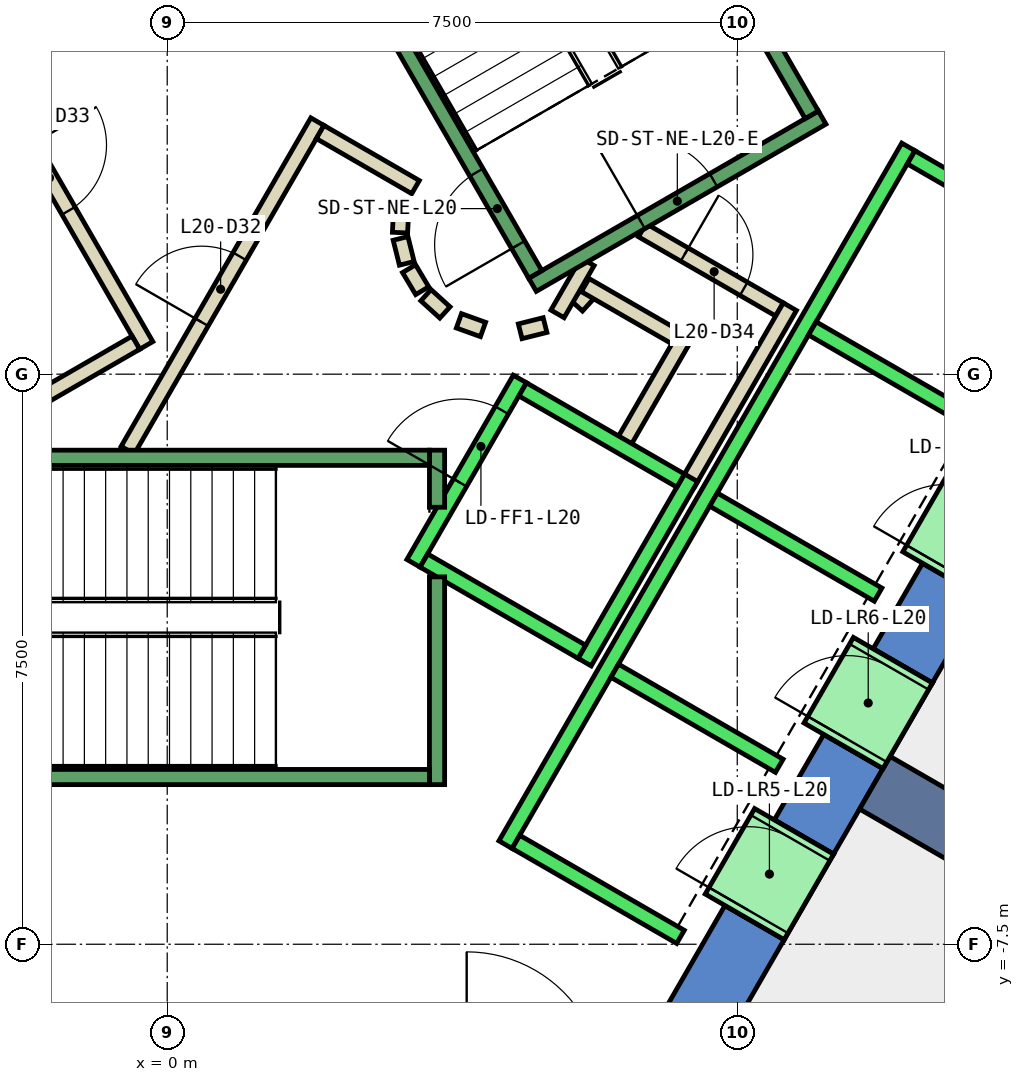
"""IFC4 building model, lengths in metres.
Left out: names, types, materials, properties, quantities, classifications, styles, units other than length and angle.
Written with IfcOpenShell. Run it as: python <this file> out.ifc"""

import sys

from ifc_helpers import new_model, si_unit, direction, frame, frame_2d, origin, place, context, subcontext, project, spatial, polyline, rectangle, outline, extrude, element, fill, save


model = new_model("IFC4")
c1 = context("Model", 3, precision=1e-05, world=origin(), true_north=direction((0.0, 1.0)))
c2 = subcontext(c1, "Body", "Model", "MODEL_VIEW")
j1 = project(units=[si_unit("LENGTHUNIT", "METRE"), si_unit("PLANEANGLEUNIT", "RADIAN")], contexts=[c1])
p1 = place(None, origin())
s1 = spatial("IfcSite", under=j1, at=p1, CompositionType="ELEMENT")
p2 = place(p1, origin())
s2 = spatial("IfcBuilding", under=s1, at=p2, CompositionType="ELEMENT")
p3 = place(p2, frame((0.0, 0.0, 95.0)))
s3 = spatial("IfcBuildingStorey", under=s2, at=p3, CompositionType="ELEMENT", Elevation=95.0)
p4 = place(p3, frame((0.0, 0.0, -0.4)))
e1 = element("IfcWall", 1, at=p4, inside=s3, PredefinedType="SHEAR", context=c2, shape_type="SweptSolid", body=[
    extrude(outline(polyline([(8.517, 11.748), (7.738, 11.298), (12.817, 2.5), (13.856, 2.5), (8.517, 11.748)])), origin(), (0.0, 0.0, 1.0), 4.2),
])
p5 = place(p3, frame((0.0, 0.0, -0.4)))
e2 = element("IfcWall", 2, at=p5, inside=s3, PredefinedType="SHEAR", context=c2, shape_type="SweptSolid", body=[
    extrude(outline(polyline([(8.117, -7.44), (7.338, -6.99), (6.409, -8.6), (6.928, -9.5), (8.117, -7.44)])), origin(), (0.0, 0.0, 1.0), 4.2),
])
p6 = place(p3, frame((0.0, 0.0, -0.4)))
e3 = element("IfcWall", 3, at=p6, inside=s3, PredefinedType="SHEAR", context=c2, shape_type="SweptSolid", body=[
    extrude(outline(polyline([(9.417, -5.189), (8.638, -4.739), (7.988, -5.864), (8.767, -6.314), (9.417, -5.189)])), origin(), (0.0, 0.0, 1.0), 4.2),
])
p7 = place(p3, frame((0.0, 0.0, -0.4)))
e4 = element("IfcWall", 4, at=p7, inside=s3, PredefinedType="SHEAR", context=c2, shape_type="SweptSolid", body=[
    extrude(outline(polyline([(10.717, -2.937), (9.938, -2.487), (9.288, -3.613), (10.067, -4.063), (10.717, -2.937)])), origin(), (0.0, 0.0, 1.0), 4.2),
])
p8 = place(p3, frame((0.0, 0.0, 3.6)))
e5 = element("IfcWall", 5, at=p8, inside=s3, PredefinedType="SHEAR", context=c2, shape_type="SweptSolid", body=[
    extrude(outline(polyline([(8.767, -6.314), (7.988, -5.864), (7.338, -6.99), (8.117, -7.44), (8.767, -6.314)])), origin(), (0.0, 0.0, 1.0), 0.2),
])
p9 = place(p3, frame((0.0, 0.0, 3.6)))
e6 = element("IfcWall", 6, at=p9, inside=s3, PredefinedType="SHEAR", context=c2, shape_type="SweptSolid", body=[
    extrude(outline(polyline([(10.067, -4.063), (9.288, -3.613), (8.638, -4.739), (9.417, -5.189), (10.067, -4.063)])), origin(), (0.0, 0.0, 1.0), 0.2),
])
p10 = place(p3, frame((0.0, 0.0, 3.6)))
e7 = element("IfcWall", 7, at=p10, inside=s3, PredefinedType="SHEAR", context=c2, shape_type="SweptSolid", body=[
    extrude(outline(polyline([(11.367, -1.811), (10.588, -1.361), (9.938, -2.487), (10.717, -2.937), (11.367, -1.811)])), origin(), (0.0, 0.0, 1.0), 0.2),
])
p11 = place(p3, frame((9.31, -5.375, -0.4), z_axis=(0.0, 0.0, 1.0), x_axis=(0.866017533419, -0.500013631625, 0.0)))
e8 = element("IfcWall", 8, at=p11, inside=s3, PredefinedType="SHEAR", context=c2, shape_type="SweptSolid", body=[
    extrude(rectangle(XDim=9.0, YDim=0.8, at=frame_2d((4.5, 0.0))), origin(), (0.0, 0.0, 1.0), 4.2),
])
p12 = place(p3, frame((5.39, 0.898, 0.0), z_axis=(0.0, 0.0, 1.0), x_axis=(0.673828488714, 0.738887791073, 0.0)))
e9 = element("IfcWall", 9, at=p12, inside=s3, PredefinedType="PARTITIONING", context=c2, shape_type="SweptSolid", body=[
    extrude(rectangle(XDim=0.263, YDim=0.2, at=frame_2d((0.131, 0.0))), origin(), (0.0, 0.0, 1.0), 3.8),
])
p13 = place(p3, frame((5.499, 1.172, 0.0), z_axis=(0.0, 0.0, 1.0), x_axis=(0.866333505267, -0.499465972466, 0.0)))
e10 = element("IfcWall", 10, at=p13, inside=s3, PredefinedType="PARTITIONING", context=c2, shape_type="SweptSolid", body=[
    extrude(rectangle(XDim=1.374, YDim=0.2, at=frame_2d((0.687, 0.0))), origin(), (0.0, 0.0, 1.0), 3.8),
])
p14 = place(p3, frame((6.826, 0.522, 0.0), z_axis=(0.0, 0.0, 1.0), x_axis=(-0.500016722714, -0.866015748706, 0.0)))
e11 = element("IfcWall", 11, at=p14, inside=s3, PredefinedType="PARTITIONING", context=c2, shape_type="SweptSolid", body=[
    extrude(rectangle(XDim=1.7, YDim=0.2, at=frame_2d((0.85, 0.0))), origin(), (0.0, 0.0, 1.0), 3.8),
])
p15 = place(p3, frame((6.25, 1.894, 0.0), z_axis=(0.0, 0.0, 1.0), x_axis=(0.866043184279, -0.499969202016, 0.0)))
e12 = element("IfcWall", 12, at=p15, inside=s3, PredefinedType="PARTITIONING", context=c2, shape_type="SweptSolid", body=[
    extrude(rectangle(XDim=2.084, YDim=0.2, at=frame_2d((1.042, 0.0))), origin(), (0.0, 0.0, 1.0), 3.8),
])
p16 = place(p15, frame((0.642, 0.0, 0.0)))
e13 = element("IfcOpeningElement", 13, at=p16, cuts=e12, PredefinedType="OPENING", context=c2, shape_type="SweptSolid", body=[
    extrude(rectangle(XDim=0.9, YDim=2.1, at=frame_2d((0.45, 1.05))), frame((0.0, 0.11, 0.0), z_axis=(0.0, -1.0, 0.0), x_axis=(1.0, 0.0, 0.0)), (0.0, 0.0, 1.0), 0.22),
])
p17 = place(p3, frame((8.192, 0.888, 0.0), z_axis=(0.0, 0.0, 1.0), x_axis=(-0.499940625693, -0.866059680843, 0.0)))
e14 = element("IfcWall", 14, at=p17, inside=s3, PredefinedType="PARTITIONING", context=c2, shape_type="SweptSolid", body=[
    extrude(rectangle(XDim=2.68, YDim=0.2, at=frame_2d((1.34, 0.0))), origin(), (0.0, 0.0, 1.0), 3.8),
])
p18 = place(p3, frame((5.135, 0.793, 0.0), z_axis=(0.0, 0.0, 1.0), x_axis=(0.499526442893, 0.866298639529, 0.0)))
e15 = element("IfcWall", 15, at=p18, inside=s3, PredefinedType="PARTITIONING", context=c2, shape_type="SweptSolid", body=[
    extrude(rectangle(XDim=0.791, YDim=0.2, at=frame_2d((0.396, 0.0))), origin(), (0.0, 0.0, 1.0), 3.8),
])
p19 = place(p3, frame((-0.52, -1.0, 0.0), z_axis=(0.0, 0.0, 1.0), x_axis=(0.50011622646, 0.865958290007, 0.0)))
e16 = element("IfcWall", 16, at=p19, inside=s3, PredefinedType="PARTITIONING", context=c2, shape_type="SweptSolid", body=[
    extrude(rectangle(XDim=4.991, YDim=0.2, at=frame_2d((2.496, 0.0))), origin(), (0.0, 0.0, 1.0), 3.8),
])
p20 = place(p19, frame((1.945, 0.0, 0.0)))
e17 = element("IfcOpeningElement", 17, at=p20, cuts=e16, PredefinedType="OPENING", context=c2, shape_type="SweptSolid", body=[
    extrude(rectangle(XDim=1.0, YDim=2.1, at=frame_2d((0.5, 1.05))), frame((0.0, 0.11, 0.0), z_axis=(0.0, -1.0, 0.0), x_axis=(1.0, 0.0, 0.0)), (0.0, 0.0, 1.0), 0.22),
])
p21 = place(p3, frame((2.012, 3.186, 0.0), z_axis=(0.0, 0.0, 1.0), x_axis=(0.865891012941, -0.500232699559, 0.0)))
e18 = element("IfcWall", 18, at=p21, inside=s3, PredefinedType="PARTITIONING", context=c2, shape_type="SweptSolid", body=[
    extrude(rectangle(XDim=1.449, YDim=0.2, at=frame_2d((0.725, 0.0))), origin(), (0.0, 0.0, 1.0), 3.8),
])
p22 = place(p3, frame((3.079, 2.199, 0.0), z_axis=(0.0, 0.0, 1.0), x_axis=(-0.047771483479, -0.998858290933, 0.0)))
e19 = element("IfcWall", 19, at=p22, inside=s3, PredefinedType="PARTITIONING", context=c2, shape_type="SweptSolid", body=[
    extrude(rectangle(XDim=0.337, YDim=0.2, at=frame_2d((0.169, 0.0))), origin(), (0.0, 0.0, 1.0), 3.8),
])
p23 = place(p3, frame((3.07, 1.786, 0.0), z_axis=(0.0, 0.0, 1.0), x_axis=(0.242705583207, -0.970099994784, 0.0)))
e20 = element("IfcWall", 20, at=p23, inside=s3, PredefinedType="PARTITIONING", context=c2, shape_type="SweptSolid", body=[
    extrude(rectangle(XDim=0.338, YDim=0.2, at=frame_2d((0.169, 0.0))), origin(), (0.0, 0.0, 1.0), 3.8),
])
for number, where, z_axis, x_axis in (
    (21, (3.182, 1.388, 0.0), (0.0, 0.0, 1.0), (0.512, -0.859, 0.0)),
    (22, (3.404, 1.039, 0.0), (0.0, 0.0, 1.0), (0.74, -0.672, 0.0)),
):
    element("IfcWall", number, at=place(p3, frame(where, z_axis=z_axis, x_axis=x_axis)), inside=s3, PredefinedType="PARTITIONING", context=c2, shape_type="SweptSolid", body=[
        extrude(rectangle(XDim=0.338, YDim=0.2, at=frame_2d((0.169, 0.0))), origin(), (0.0, 0.0, 1.0), 3.8),
    ])
p24 = place(p3, frame((3.838, 0.702, 0.0), z_axis=(0.0, 0.0, 1.0), x_axis=(0.941035081519, -0.338308993895, 0.0)))
e23 = element("IfcWall", 23, at=p24, inside=s3, PredefinedType="PARTITIONING", context=c2, shape_type="SweptSolid", body=[
    extrude(rectangle(XDim=0.337, YDim=0.2, at=frame_2d((0.168, 0.0))), origin(), (0.0, 0.0, 1.0), 3.8),
])
p25 = place(p3, frame((4.644, 0.564, 0.0), z_axis=(0.0, 0.0, 1.0), x_axis=(0.969929076366, 0.243387729394, 0.0)))
e24 = element("IfcWall", 24, at=p25, inside=s3, PredefinedType="PARTITIONING", context=c2, shape_type="SweptSolid", body=[
    extrude(rectangle(XDim=0.337, YDim=0.2, at=frame_2d((0.168, 0.0))), origin(), (0.0, 0.0, 1.0), 3.8),
])
p26 = place(p3, frame((-2.771, 4.7, 0.0), z_axis=(0.0, 0.0, 1.0), x_axis=(0.499969479948, -0.866043023828, 0.0)))
e25 = element("IfcWall", 25, at=p26, inside=s3, PredefinedType="PARTITIONING", context=c2, shape_type="SweptSolid", body=[
    extrude(rectangle(XDim=4.99, YDim=0.2, at=frame_2d((2.495, 0.0))), origin(), (0.0, 0.0, 1.0), 3.8),
])
p27 = place(p26, frame((1.945, 0.0, 0.0)))
e26 = element("IfcOpeningElement", 26, at=p27, cuts=e25, PredefinedType="OPENING", context=c2, shape_type="SweptSolid", body=[
    extrude(rectangle(XDim=1.0, YDim=2.1, at=frame_2d((0.5, 1.05))), frame((0.0, 0.11, 0.0), z_axis=(0.0, -1.0, 0.0), x_axis=(1.0, 0.0, 0.0)), (0.0, 0.0, 1.0), 0.22),
])
p28 = place(p3, frame((-0.412, 0.414, 0.0), z_axis=(0.0, 0.0, 1.0), x_axis=(-0.866017369001, -0.500013916395, 0.0)))
e27 = element("IfcWall", 27, at=p28, inside=s3, PredefinedType="PARTITIONING", context=c2, shape_type="SweptSolid", body=[
    extrude(rectangle(XDim=1.45, YDim=0.2, at=frame_2d((0.725, 0.0))), origin(), (0.0, 0.0, 1.0), 3.8),
])
p29 = place(p3, frame((12.401, -7.621, 0.0), z_axis=(0.0, 0.0, 1.0), x_axis=(-0.499983724212, -0.866034800411, 0.0)))
e28 = element("IfcWall", 28, at=p29, inside=s3, PredefinedType="PARTITIONING", context=c2, shape_type="SweptSolid", body=[
    extrude(rectangle(XDim=9.302, YDim=0.2, at=frame_2d((4.651, 0.0))), origin(), (0.0, 0.0, 1.0), 3.8),
])
p30 = place(p3, frame((3.24, -2.488, 0.0), z_axis=(0.0, 0.0, 1.0), x_axis=(0.49994636267, 0.866056369097, 0.0)))
e29 = element("IfcWall", 29, at=p30, inside=s3, PredefinedType="STANDARD", context=c2, shape_type="SweptSolid", body=[
    extrude(rectangle(XDim=2.8, YDim=0.2, at=frame_2d((1.4, 0.0))), origin(), (0.0, 0.0, 1.0), 3.8),
])
p31 = place(p30, frame((1.225, 0.0, 0.0)))
e30 = element("IfcOpeningElement", 30, at=p31, cuts=e29, PredefinedType="OPENING", context=c2, shape_type="SweptSolid", body=[
    extrude(rectangle(XDim=1.1, YDim=2.1, at=frame_2d((0.55, 1.05))), frame((0.0, 0.11, 0.0), z_axis=(0.0, -1.0, 0.0), x_axis=(1.0, 0.0, 0.0)), (0.0, 0.0, 1.0), 0.22),
])
p32 = place(p3, frame((5.492, -3.788, 0.0), z_axis=(0.0, 0.0, 1.0), x_axis=(0.500011755427, 0.866018616679, 0.0)))
e31 = element("IfcWall", 31, at=p32, inside=s3, PredefinedType="STANDARD", context=c2, shape_type="SweptSolid", body=[
    extrude(rectangle(XDim=2.8, YDim=0.2, at=frame_2d((1.4, 0.0))), origin(), (0.0, 0.0, 1.0), 3.8),
])
p33 = place(p3, frame((3.377, -2.452, 0.0), z_axis=(0.0, 0.0, 1.0), x_axis=(0.865955154139, -0.50012165622, 0.0)))
e32 = element("IfcWall", 32, at=p33, inside=s3, PredefinedType="STANDARD", context=c2, shape_type="SweptSolid", body=[
    extrude(rectangle(XDim=2.4, YDim=0.2, at=frame_2d((1.2, 0.0))), origin(), (0.0, 0.0, 1.0), 3.8),
])
p34 = place(p3, frame((4.677, -0.2, 0.0), z_axis=(0.0, 0.0, 1.0), x_axis=(0.865973769406, -0.500089422704, 0.0)))
e33 = element("IfcWall", 33, at=p34, inside=s3, PredefinedType="STANDARD", context=c2, shape_type="SweptSolid", body=[
    extrude(rectangle(XDim=2.399, YDim=0.2, at=frame_2d((1.2, 0.0))), origin(), (0.0, 0.0, 1.0), 3.8),
])
p35 = place(p3, frame((4.451, -6.19, 0.0), z_axis=(0.0, 0.0, 1.0), x_axis=(0.50000090737, 0.866024879913, 0.0)))
e34 = element("IfcWall", 34, at=p35, inside=s3, PredefinedType="STANDARD", context=c2, shape_type="SweptSolid", body=[
    extrude(rectangle(XDim=10.6, YDim=0.2, at=frame_2d((5.3, 0.0))), origin(), (0.0, 0.0, 1.0), 3.8),
])
for number, where, z_axis, x_axis in (
    (35, (4.588, -6.153, 0.0), (0.0, 0.0, 1.0), (0.866, -0.5, 0.0)),
    (36, (5.888, -3.902, 0.0), (0.0, 0.0, 1.0), (0.866, -0.5, 0.0)),
    (37, (7.188, -1.65, 0.0), (0.0, 0.0, 1.0), (0.866, -0.5, 0.0)),
    (38, (8.488, 0.602, 0.0), (0.0, 0.0, 1.0), (0.866, -0.5, 0.0)),
):
    element("IfcWall", number, at=place(p3, frame(where, z_axis=z_axis, x_axis=x_axis)), inside=s3, PredefinedType="STANDARD", context=c2, shape_type="SweptSolid", body=[
        extrude(rectangle(XDim=2.5, YDim=0.2, at=frame_2d((1.25, 0.0))), origin(), (0.0, 0.0, 1.0), 3.8),
    ])
p36 = place(p3, frame((9.788, 2.853, 0.0), z_axis=(0.0, 0.0, 1.0), x_axis=(0.865998541277, -0.500046524342, 0.0)))
e39 = element("IfcWall", 39, at=p36, inside=s3, PredefinedType="STANDARD", context=c2, shape_type="SweptSolid", body=[
    extrude(rectangle(XDim=2.5, YDim=0.2, at=frame_2d((1.25, 0.0))), origin(), (0.0, 0.0, 1.0), 3.8),
])
p37 = place(p3, frame((7.598, -7.14, 0.0), z_axis=(0.0, 0.0, 1.0), x_axis=(0.500362116554, 0.865816234728, 0.0)))
e40 = element("IfcWall", 40, at=p37, inside=s3, PredefinedType="STANDARD", context=c2, shape_type="SweptSolid", body=[
    extrude(rectangle(XDim=1.299, YDim=1.2, at=frame_2d((0.65, 0.0))), origin(), (0.0, 0.0, 1.0), 2.4),
])
p38 = place(p37, frame((0.1, 0.0, 0.0)))
e41 = element("IfcOpeningElement", 41, at=p38, cuts=e40, PredefinedType="OPENING", context=c2, shape_type="SweptSolid", body=[
    extrude(rectangle(XDim=1.1, YDim=2.3, at=frame_2d((0.55, 1.15))), frame((0.0, 0.61, 0.0), z_axis=(0.0, -1.0, 0.0), x_axis=(1.0, 0.0, 0.0)), (0.0, 0.0, 1.0), 1.22),
])
p39 = place(p3, frame((8.898, -4.889, 0.0), z_axis=(0.0, 0.0, 1.0), x_axis=(0.500036693733, 0.866004217611, 0.0)))
e42 = element("IfcWall", 42, at=p39, inside=s3, PredefinedType="STANDARD", context=c2, shape_type="SweptSolid", body=[
    extrude(rectangle(XDim=1.3, YDim=1.2, at=frame_2d((0.65, 0.0))), origin(), (0.0, 0.0, 1.0), 2.4),
])
p40 = place(p39, frame((0.1, 0.0, 0.0)))
e43 = element("IfcOpeningElement", 43, at=p40, cuts=e42, PredefinedType="OPENING", context=c2, shape_type="SweptSolid", body=[
    extrude(rectangle(XDim=1.1, YDim=2.3, at=frame_2d((0.55, 1.15))), frame((0.0, 0.61, 0.0), z_axis=(0.0, -1.0, 0.0), x_axis=(1.0, 0.0, 0.0)), (0.0, 0.0, 1.0), 1.22),
])
p41 = place(p3, frame((10.198, -2.637, 0.0), z_axis=(0.0, 0.0, 1.0), x_axis=(0.49989585183, 0.866085525409, 0.0)))
e44 = element("IfcWall", 44, at=p41, inside=s3, PredefinedType="STANDARD", context=c2, shape_type="SweptSolid", body=[
    extrude(rectangle(XDim=1.3, YDim=1.2, at=frame_2d((0.65, 0.0))), origin(), (0.0, 0.0, 1.0), 2.4),
])
p42 = place(p41, frame((0.1, 0.0, 0.0)))
e45 = element("IfcOpeningElement", 45, at=p42, cuts=e44, PredefinedType="OPENING", context=c2, shape_type="SweptSolid", body=[
    extrude(rectangle(XDim=1.1, YDim=2.3, at=frame_2d((0.55, 1.15))), frame((0.0, 0.61, 0.0), z_axis=(0.0, -1.0, 0.0), x_axis=(1.0, 0.0, 0.0)), (0.0, 0.0, 1.0), 1.22),
])
p43 = place(p3, frame((3.55, -2.667, 0.0), z_axis=(0.0, 0.0, 1.0), x_axis=(0.0, -1.0, 0.0)))
e46 = element("IfcWall", 46, at=p43, inside=s3, PredefinedType="STANDARD", context=c2, shape_type="SweptSolid", body=[
    extrude(rectangle(XDim=2.733, YDim=0.2, at=frame_2d((1.366, 0.0))), origin(), (0.0, 0.0, 1.0), 3.8),
])
p44 = place(p3, frame((3.55, -1.0, 0.0), z_axis=(0.0, 0.0, 1.0), x_axis=(0.0, -1.0, 0.0)))
e47 = element("IfcWall", 47, at=p44, inside=s3, PredefinedType="STANDARD", context=c2, shape_type="SweptSolid", body=[
    extrude(rectangle(XDim=0.751, YDim=0.2, at=frame_2d((0.375, 0.0))), origin(), (0.0, 0.0, 1.0), 3.8),
])
p45 = place(p3, frame((-3.45, -1.1, 0.0), z_axis=(0.0, 0.0, 1.0), x_axis=(1.0, 0.0, 0.0)))
e48 = element("IfcWall", 48, at=p45, inside=s3, PredefinedType="STANDARD", context=c2, shape_type="SweptSolid", body=[
    extrude(rectangle(XDim=6.9, YDim=0.2, at=frame_2d((3.45, 0.0))), origin(), (0.0, 0.0, 1.0), 3.8),
])
p46 = place(p45, frame((0.45, 0.0, 0.0)))
e49 = element("IfcOpeningElement", 49, at=p46, cuts=e48, PredefinedType="OPENING", context=c2, shape_type="SweptSolid", body=[
    extrude(rectangle(XDim=1.1, YDim=2.2, at=frame_2d((0.55, 1.1))), frame((0.0, 0.11, 0.0), z_axis=(0.0, -1.0, 0.0), x_axis=(1.0, 0.0, 0.0)), (0.0, 0.0, 1.0), 0.22),
])
p47 = place(p3, frame((-3.45, -5.3, 0.0), z_axis=(0.0, 0.0, 1.0), x_axis=(1.0, 0.0, 0.0)))
e50 = element("IfcWall", 50, at=p47, inside=s3, PredefinedType="STANDARD", context=c2, shape_type="SweptSolid", body=[
    extrude(rectangle(XDim=6.9, YDim=0.2, at=frame_2d((3.45, 0.0))), origin(), (0.0, 0.0, 1.0), 3.8),
])
p48 = place(p3, frame((4.806, 1.176, 0.0), z_axis=(0.0, 0.0, 1.0), x_axis=(0.866059941101, 0.499940174841, 0.0)))
e51 = element("IfcWall", 51, at=p48, inside=s3, PredefinedType="STANDARD", context=c2, shape_type="SweptSolid", body=[
    extrude(rectangle(XDim=4.4, YDim=0.2, at=frame_2d((2.2, 0.0))), origin(), (0.0, 0.0, 1.0), 3.8),
])
p49 = place(p48, frame((1.65, 0.0, 0.0)))
e52 = element("IfcOpeningElement", 52, at=p49, cuts=e51, PredefinedType="OPENING", context=c2, shape_type="SweptSolid", body=[
    extrude(rectangle(XDim=1.1, YDim=2.2, at=frame_2d((0.55, 1.1))), frame((0.0, 0.11, 0.0), z_axis=(0.0, -1.0, 0.0), x_axis=(1.0, 0.0, 0.0)), (0.0, 0.0, 1.0), 0.22),
])
p50 = place(p3, frame((4.843, 1.312, 0.0), z_axis=(0.0, 0.0, 1.0), x_axis=(-0.499963383562, 0.866046543262, 0.0)))
e53 = element("IfcWall", 53, at=p50, inside=s3, PredefinedType="STANDARD", context=c2, shape_type="SweptSolid", body=[
    extrude(rectangle(XDim=6.9, YDim=0.2, at=frame_2d((3.45, 0.0))), origin(), (0.0, 0.0, 1.0), 3.8),
])
p51 = place(p50, frame((0.45, 0.0, 0.0)))
e54 = element("IfcOpeningElement", 54, at=p51, cuts=e53, PredefinedType="OPENING", context=c2, shape_type="SweptSolid", body=[
    extrude(rectangle(XDim=1.1, YDim=2.2, at=frame_2d((0.55, 1.1))), frame((0.0, 0.11, 0.0), z_axis=(0.0, -1.0, 0.0), x_axis=(1.0, 0.0, 0.0)), (0.0, 0.0, 1.0), 0.22),
])
p52 = place(p3, frame((8.48, 3.412, 0.0), z_axis=(0.0, 0.0, 1.0), x_axis=(-0.499978703459, 0.866037698999, 0.0)))
e55 = element("IfcWall", 55, at=p52, inside=s3, PredefinedType="STANDARD", context=c2, shape_type="SweptSolid", body=[
    extrude(rectangle(XDim=6.9, YDim=0.2, at=frame_2d((3.45, 0.0))), origin(), (0.0, 0.0, 1.0), 3.8),
])
p53 = place(p3, frame((-1.393, 7.288, 0.0), z_axis=(0.0, 0.0, 1.0), x_axis=(-0.499963383562, -0.866046543262, 0.0)))
e56 = element("IfcWall", 56, at=p53, inside=s3, PredefinedType="STANDARD", context=c2, shape_type="SweptSolid", body=[
    extrude(rectangle(XDim=6.9, YDim=0.2, at=frame_2d((3.45, 0.0))), origin(), (0.0, 0.0, 1.0), 3.8),
])
p54 = place(p53, frame((0.45, 0.0, 0.0)))
e57 = element("IfcOpeningElement", 57, at=p54, cuts=e56, PredefinedType="OPENING", context=c2, shape_type="SweptSolid", body=[
    extrude(rectangle(XDim=1.1, YDim=2.2, at=frame_2d((0.55, 1.1))), frame((0.0, 0.11, 0.0), z_axis=(0.0, -1.0, 0.0), x_axis=(1.0, 0.0, 0.0)), (0.0, 0.0, 1.0), 0.22),
])
p55 = place(p20, origin())
e58 = element("IfcDoor", 58, at=p55, inside=s3, OperationType="SINGLE_SWING_LEFT", PredefinedType="DOOR", context=c2, shape_type="SweptSolid", body=[
    extrude(rectangle(XDim=1.0, YDim=2.1, at=frame_2d((0.5, 1.05))), frame((0.0, 0.025, 0.0), z_axis=(0.0, -1.0, 0.0), x_axis=(1.0, 0.0, 0.0)), (0.0, 0.0, 1.0), 0.05),
])
fill(e17, e58)
p56 = place(p27, origin())
e59 = element("IfcDoor", 59, at=p56, inside=s3, OperationType="SINGLE_SWING_RIGHT", PredefinedType="DOOR", context=c2, shape_type="SweptSolid", body=[
    extrude(rectangle(XDim=1.0, YDim=2.1, at=frame_2d((0.5, 1.05))), frame((0.0, 0.025, 0.0), z_axis=(0.0, -1.0, 0.0), x_axis=(1.0, 0.0, 0.0)), (0.0, 0.0, 1.0), 0.05),
])
fill(e26, e59)
p57 = place(p16, origin())
e60 = element("IfcDoor", 60, at=p57, inside=s3, OperationType="SINGLE_SWING_LEFT", PredefinedType="DOOR", context=c2, shape_type="SweptSolid", body=[
    extrude(rectangle(XDim=0.9, YDim=2.1, at=frame_2d((0.45, 1.05))), frame((0.0, 0.025, 0.0), z_axis=(0.0, -1.0, 0.0), x_axis=(1.0, 0.0, 0.0)), (0.0, 0.0, 1.0), 0.05),
])
fill(e13, e60)
p58 = place(p38, origin())
e61 = element("IfcDoor", 61, at=p58, inside=s3, OperationType="SLIDING_TO_LEFT", PredefinedType="DOOR", context=c2, shape_type="SweptSolid", body=[
    extrude(rectangle(XDim=1.1, YDim=2.3, at=frame_2d((0.55, 1.15))), frame((0.0, 0.025, 0.0), z_axis=(0.0, -1.0, 0.0), x_axis=(1.0, 0.0, 0.0)), (0.0, 0.0, 1.0), 0.05),
])
fill(e41, e61)
p59 = place(p40, origin())
e62 = element("IfcDoor", 62, at=p59, inside=s3, OperationType="SLIDING_TO_LEFT", PredefinedType="DOOR", context=c2, shape_type="SweptSolid", body=[
    extrude(rectangle(XDim=1.1, YDim=2.3, at=frame_2d((0.55, 1.15))), frame((0.0, 0.025, 0.0), z_axis=(0.0, -1.0, 0.0), x_axis=(1.0, 0.0, 0.0)), (0.0, 0.0, 1.0), 0.05),
])
fill(e43, e62)
p60 = place(p31, origin())
e63 = element("IfcDoor", 63, at=p60, inside=s3, OperationType="SLIDING_TO_LEFT", PredefinedType="DOOR", context=c2, shape_type="SweptSolid", body=[
    extrude(rectangle(XDim=1.1, YDim=2.1, at=frame_2d((0.55, 1.05))), frame((0.0, 0.025, 0.0), z_axis=(0.0, -1.0, 0.0), x_axis=(1.0, 0.0, 0.0)), (0.0, 0.0, 1.0), 0.05),
])
fill(e30, e63)
p61 = place(p51, origin())
e64 = element("IfcDoor", 64, at=p61, inside=s3, OperationType="SINGLE_SWING_LEFT", PredefinedType="DOOR", context=c2, shape_type="SweptSolid", body=[
    extrude(rectangle(XDim=1.1, YDim=2.2, at=frame_2d((0.55, 1.1))), frame((0.0, 0.025, 0.0), z_axis=(0.0, -1.0, 0.0), x_axis=(1.0, 0.0, 0.0)), (0.0, 0.0, 1.0), 0.05),
])
fill(e54, e64)
p62 = place(p49, origin())
e65 = element("IfcDoor", 65, at=p62, inside=s3, OperationType="SINGLE_SWING_LEFT", PredefinedType="DOOR", context=c2, shape_type="SweptSolid", body=[
    extrude(rectangle(XDim=1.1, YDim=2.2, at=frame_2d((0.55, 1.1))), frame((0.0, 0.025, 0.0), z_axis=(0.0, -1.0, 0.0), x_axis=(1.0, 0.0, 0.0)), (0.0, 0.0, 1.0), 0.05),
])
fill(e52, e65)
save(model, sys.argv[1])
